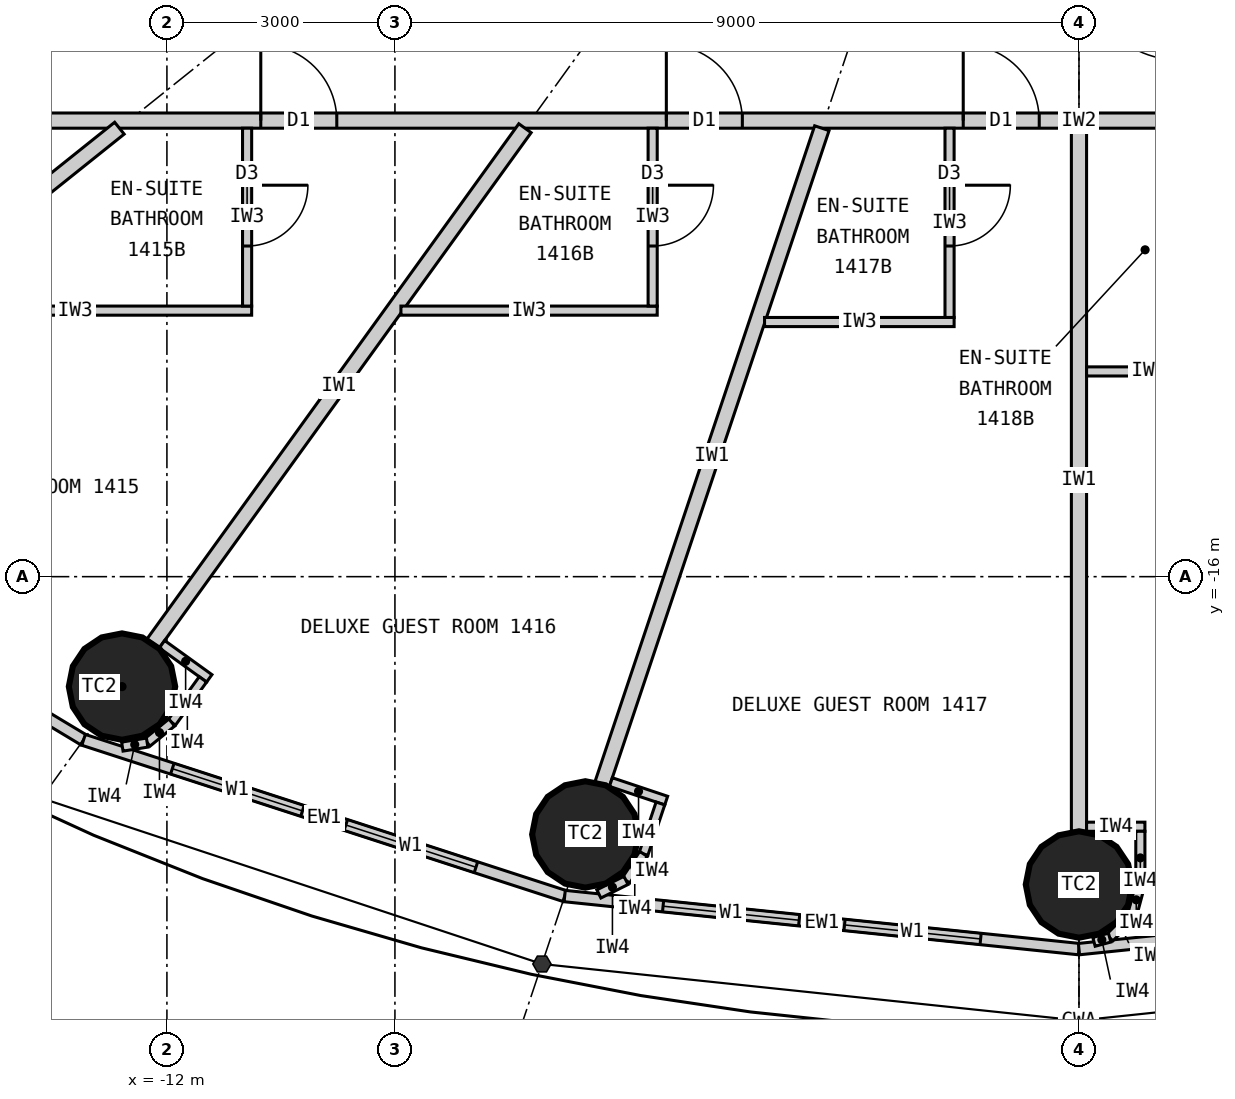
"""IFC4 building model, lengths in metres.
Left out: names, types, materials, properties, quantities, classifications, styles, units other than length and angle.
Written with IfcOpenShell. Run it as: python <this file> out.ifc"""

import sys

from ifc_helpers import new_model, si_unit, direction, frame, frame_2d, origin, origin_2d, place, context, subcontext, project, spatial, rectangle, circle, extrude, element, fill, save


model = new_model("IFC4")
c1 = context("Model", 3, precision=1e-05, world=origin(), true_north=direction((0.0, 1.0)))
c2 = subcontext(c1, "Body", "Model", "MODEL_VIEW")
j1 = project(units=[si_unit("LENGTHUNIT", "METRE"), si_unit("PLANEANGLEUNIT", "RADIAN")], contexts=[c1])
p1 = place(None, origin())
s1 = spatial("IfcSite", under=j1, at=p1, CompositionType="ELEMENT")
p2 = place(p1, origin())
s2 = spatial("IfcBuilding", under=s1, at=p2, CompositionType="ELEMENT")
p3 = place(p2, frame((0.0, 0.0, 60.6)))
s3 = spatial("IfcBuildingStorey", under=s2, at=p3, CompositionType="ELEMENT", Elevation=60.6)
for number, where, z_axis, x_axis in (
    (1, (-12.591, -17.447, 0.0), (0.0, 0.0, 1.0), (1.0, 0.0, 0.0)),
    (2, (-6.495, -19.391, 0.0), (0.0, 0.0, 1.0), (1.0, 0.0, 0.0)),
    (3, (0.0, -20.05, 0.0), (0.0, 0.0, 1.0), (1.0, 0.0, 0.0)),
):
    element("IfcColumn", number, at=place(p3, frame(where, z_axis=z_axis, x_axis=x_axis)), inside=s3, PredefinedType="COLUMN", context=c2, shape_type="SweptSolid", body=[
        extrude(circle(Radius=0.7, at=origin_2d()), origin(), (0.0, 0.0, 1.0), 3.3),
    ])
p4 = place(p3, frame((-18.57, -14.856, 0.0), z_axis=(0.0, 0.0, 1.0), x_axis=(0.856983180864, -0.515344377787, 0.0)))
e4 = element("IfcWall", 4, at=p4, inside=s3, PredefinedType="ELEMENTEDWALL", context=c2, shape_type="SweptSolid", body=[
    extrude(rectangle(XDim=6.386, YDim=0.15, at=frame_2d((3.193, 0.0))), origin(), (0.0, 0.0, 1.0), 3.12),
])
p5 = place(p4, frame((1.093, 0.0, 0.9)))
e5 = element("IfcOpeningElement", 5, at=p5, cuts=e4, PredefinedType="OPENING", context=c2, shape_type="SweptSolid", body=[
    extrude(rectangle(XDim=1.8, YDim=1.9, at=frame_2d((0.9, 0.95))), frame((0.0, 0.085, 0.0), z_axis=(0.0, -1.0, 0.0), x_axis=(1.0, 0.0, 0.0)), (0.0, 0.0, 1.0), 0.17),
])
p6 = place(p4, frame((3.493, 0.0, 0.9)))
e6 = element("IfcOpeningElement", 6, at=p6, cuts=e4, PredefinedType="OPENING", context=c2, shape_type="SweptSolid", body=[
    extrude(rectangle(XDim=1.8, YDim=1.9, at=frame_2d((0.9, 0.95))), frame((0.0, 0.085, 0.0), z_axis=(0.0, -1.0, 0.0), x_axis=(1.0, 0.0, 0.0)), (0.0, 0.0, 1.0), 0.17),
])
p7 = place(p3, frame((-13.096, -18.147, 0.0), z_axis=(0.0, 0.0, 1.0), x_axis=(0.951137534625, -0.308767534285, 0.0)))
e7 = element("IfcWall", 7, at=p7, inside=s3, PredefinedType="ELEMENTEDWALL", context=c2, shape_type="SweptSolid", body=[
    extrude(rectangle(XDim=6.655, YDim=0.15, at=frame_2d((3.328, 0.0))), origin(), (0.0, 0.0, 1.0), 3.12),
])
p8 = place(p7, frame((1.228, 0.0, 0.9)))
e8 = element("IfcOpeningElement", 8, at=p8, cuts=e7, PredefinedType="OPENING", context=c2, shape_type="SweptSolid", body=[
    extrude(rectangle(XDim=1.8, YDim=1.9, at=frame_2d((0.9, 0.95))), frame((0.0, 0.085, 0.0), z_axis=(0.0, -1.0, 0.0), x_axis=(1.0, 0.0, 0.0)), (0.0, 0.0, 1.0), 0.17),
])
p9 = place(p7, frame((3.628, 0.0, 0.9)))
e9 = element("IfcOpeningElement", 9, at=p9, cuts=e7, PredefinedType="OPENING", context=c2, shape_type="SweptSolid", body=[
    extrude(rectangle(XDim=1.8, YDim=1.9, at=frame_2d((0.9, 0.95))), frame((0.0, 0.085, 0.0), z_axis=(0.0, -1.0, 0.0), x_axis=(1.0, 0.0, 0.0)), (0.0, 0.0, 1.0), 0.17),
])
p10 = place(p3, frame((-6.766, -20.202, 0.0), z_axis=(0.0, 0.0, 1.0), x_axis=(0.994721394369, -0.102612609291, 0.0)))
e10 = element("IfcWall", 10, at=p10, inside=s3, PredefinedType="ELEMENTEDWALL", context=c2, shape_type="SweptSolid", body=[
    extrude(rectangle(XDim=6.802, YDim=0.15, at=frame_2d((3.401, 0.0))), origin(), (0.0, 0.0, 1.0), 3.12),
])
p11 = place(p10, frame((1.301, 0.0, 0.9)))
e11 = element("IfcOpeningElement", 11, at=p11, cuts=e10, PredefinedType="OPENING", context=c2, shape_type="SweptSolid", body=[
    extrude(rectangle(XDim=1.8, YDim=1.9, at=frame_2d((0.9, 0.95))), frame((0.0, 0.085, 0.0), z_axis=(0.0, -1.0, 0.0), x_axis=(1.0, 0.0, 0.0)), (0.0, 0.0, 1.0), 0.17),
])
p12 = place(p10, frame((3.701, 0.0, 0.9)))
e12 = element("IfcOpeningElement", 12, at=p12, cuts=e10, PredefinedType="OPENING", context=c2, shape_type="SweptSolid", body=[
    extrude(rectangle(XDim=1.8, YDim=1.9, at=frame_2d((0.9, 0.95))), frame((0.0, 0.085, 0.0), z_axis=(0.0, -1.0, 0.0), x_axis=(1.0, 0.0, 0.0)), (0.0, 0.0, 1.0), 0.17),
])
p13 = place(p3, frame((0.0, -20.9, 0.0), z_axis=(0.0, 0.0, 1.0), x_axis=(0.994721394369, 0.102612609291, 0.0)))
e13 = element("IfcWall", 13, at=p13, inside=s3, PredefinedType="ELEMENTEDWALL", context=c2, shape_type="SweptSolid", body=[
    extrude(rectangle(XDim=6.802, YDim=0.15, at=frame_2d((3.401, 0.0))), origin(), (0.0, 0.0, 1.0), 3.12),
])
p14 = place(p13, frame((1.301, 0.0, 0.9)))
e14 = element("IfcOpeningElement", 14, at=p14, cuts=e13, PredefinedType="OPENING", context=c2, shape_type="SweptSolid", body=[
    extrude(rectangle(XDim=1.8, YDim=1.9, at=frame_2d((0.9, 0.95))), frame((0.0, 0.085, 0.0), z_axis=(0.0, -1.0, 0.0), x_axis=(1.0, 0.0, 0.0)), (0.0, 0.0, 1.0), 0.17),
])
p15 = place(p13, frame((3.701, 0.0, 0.9)))
e15 = element("IfcOpeningElement", 15, at=p15, cuts=e13, PredefinedType="OPENING", context=c2, shape_type="SweptSolid", body=[
    extrude(rectangle(XDim=1.8, YDim=1.9, at=frame_2d((0.9, 0.95))), frame((0.0, 0.085, 0.0), z_axis=(0.0, -1.0, 0.0), x_axis=(1.0, 0.0, 0.0)), (0.0, 0.0, 1.0), 0.17),
])
p16 = place(p3, frame((14.1, -10.0, 0.0), z_axis=(0.0, 0.0, 1.0), x_axis=(-1.0, 0.0, 0.0)))
e16 = element("IfcWall", 16, at=p16, inside=s3, PredefinedType="PARTITIONING", context=c2, shape_type="SweptSolid", body=[
    extrude(rectangle(XDim=28.2, YDim=0.2, at=frame_2d((14.1, 0.0))), origin(), (0.0, 0.0, 1.0), 3.12),
])
p17 = place(p16, frame((23.865, 0.0, 0.0)))
e17 = element("IfcOpeningElement", 17, at=p17, cuts=e16, PredefinedType="OPENING", context=c2, shape_type="SweptSolid", body=[
    extrude(rectangle(XDim=1.0, YDim=2.2, at=frame_2d((0.5, 1.1))), frame((0.0, 0.11, 0.0), z_axis=(0.0, -1.0, 0.0), x_axis=(1.0, 0.0, 0.0)), (0.0, 0.0, 1.0), 0.22),
])
p18 = place(p16, frame((18.529, 0.0, 0.0)))
e18 = element("IfcOpeningElement", 18, at=p18, cuts=e16, PredefinedType="OPENING", context=c2, shape_type="SweptSolid", body=[
    extrude(rectangle(XDim=1.0, YDim=2.2, at=frame_2d((0.5, 1.1))), frame((0.0, 0.11, 0.0), z_axis=(0.0, -1.0, 0.0), x_axis=(1.0, 0.0, 0.0)), (0.0, 0.0, 1.0), 0.22),
])
p19 = place(p16, frame((14.623, 0.0, 0.0)))
e19 = element("IfcOpeningElement", 19, at=p19, cuts=e16, PredefinedType="OPENING", context=c2, shape_type="SweptSolid", body=[
    extrude(rectangle(XDim=1.0, YDim=2.2, at=frame_2d((0.5, 1.1))), frame((0.0, 0.11, 0.0), z_axis=(0.0, -1.0, 0.0), x_axis=(1.0, 0.0, 0.0)), (0.0, 0.0, 1.0), 0.22),
])
p20 = place(p16, frame((11.24, 0.0, 0.0)))
e20 = element("IfcOpeningElement", 20, at=p20, cuts=e16, PredefinedType="OPENING", context=c2, shape_type="SweptSolid", body=[
    extrude(rectangle(XDim=1.0, YDim=2.2, at=frame_2d((0.5, 1.1))), frame((0.0, 0.11, 0.0), z_axis=(0.0, -1.0, 0.0), x_axis=(1.0, 0.0, 0.0)), (0.0, 0.0, 1.0), 0.22),
])
p21 = place(p16, frame((8.671, 0.0, 0.0)))
e21 = element("IfcOpeningElement", 21, at=p21, cuts=e16, PredefinedType="OPENING", context=c2, shape_type="SweptSolid", body=[
    extrude(rectangle(XDim=1.0, YDim=2.2, at=frame_2d((0.5, 1.1))), frame((0.0, 0.11, 0.0), z_axis=(0.0, -1.0, 0.0), x_axis=(1.0, 0.0, 0.0)), (0.0, 0.0, 1.0), 0.22),
])
p22 = place(p16, frame((2.801, 0.0, 0.0)))
e22 = element("IfcOpeningElement", 22, at=p22, cuts=e16, PredefinedType="OPENING", context=c2, shape_type="SweptSolid", body=[
    extrude(rectangle(XDim=1.0, YDim=2.2, at=frame_2d((0.5, 1.1))), frame((0.0, 0.11, 0.0), z_axis=(0.0, -1.0, 0.0), x_axis=(1.0, 0.0, 0.0)), (0.0, 0.0, 1.0), 0.22),
])
p23 = place(p3, frame((-12.625, -10.1, 0.0), z_axis=(0.0, 0.0, 1.0), x_axis=(-0.780892451574, -0.624665493744, 0.0)))
e23 = element("IfcWall", 23, at=p23, inside=s3, PredefinedType="PARTITIONING", context=c2, shape_type="SweptSolid", body=[
    extrude(rectangle(XDim=6.045, YDim=0.2, at=frame_2d((3.022, 0.0))), origin(), (0.0, 0.0, 1.0), 2.32),
])
p24 = place(p3, frame((-7.289, -10.1, 0.0), z_axis=(0.0, 0.0, 1.0), x_axis=(-0.585198353053, -0.810890182197, 0.0)))
e24 = element("IfcWall", 24, at=p24, inside=s3, PredefinedType="PARTITIONING", context=c2, shape_type="SweptSolid", body=[
    extrude(rectangle(XDim=8.36, YDim=0.2, at=frame_2d((4.18, 0.0))), origin(), (0.0, 0.0, 1.0), 2.32),
])
p25 = place(p3, frame((-3.383, -10.1, 0.0), z_axis=(0.0, 0.0, 1.0), x_axis=(-0.31759592231, -0.948226149256, 0.0)))
e25 = element("IfcWall", 25, at=p25, inside=s3, PredefinedType="PARTITIONING", context=c2, shape_type="SweptSolid", body=[
    extrude(rectangle(XDim=9.098, YDim=0.2, at=frame_2d((4.549, 0.0))), origin(), (0.0, 0.0, 1.0), 2.32),
])
p26 = place(p3, frame((0.0, -10.1, 0.0), z_axis=(0.0, 0.0, 1.0), x_axis=(0.0, -1.0, 0.0)))
e26 = element("IfcWall", 26, at=p26, inside=s3, PredefinedType="PARTITIONING", context=c2, shape_type="SweptSolid", body=[
    extrude(rectangle(XDim=9.25, YDim=0.2, at=frame_2d((4.625, 0.0))), origin(), (0.0, 0.0, 1.0), 2.32),
])
p27 = place(p3, frame((-15.525, -12.5, 0.0), z_axis=(0.0, 0.0, 1.0), x_axis=(1.0, 0.0, 0.0)))
e27 = element("IfcWall", 27, at=p27, inside=s3, PredefinedType="PARTITIONING", context=c2, shape_type="SweptSolid", body=[
    extrude(rectangle(XDim=4.64, YDim=0.12, at=frame_2d((2.32, 0.0))), origin(), (0.0, 0.0, 1.0), 3.12),
])
p28 = place(p3, frame((-10.945, -10.1, 0.0), z_axis=(0.0, 0.0, 1.0), x_axis=(0.0, -1.0, 0.0)))
e28 = element("IfcWall", 28, at=p28, inside=s3, PredefinedType="PARTITIONING", context=c2, shape_type="SweptSolid", body=[
    extrude(rectangle(XDim=2.34, YDim=0.12, at=frame_2d((1.17, 0.0))), origin(), (0.0, 0.0, 1.0), 3.12),
])
p29 = place(p28, frame((0.75, 0.0, 0.0)))
e29 = element("IfcOpeningElement", 29, at=p29, cuts=e28, PredefinedType="OPENING", context=c2, shape_type="SweptSolid", body=[
    extrude(rectangle(XDim=0.8, YDim=2.1, at=frame_2d((0.4, 1.05))), frame((0.0, 0.07, 0.0), z_axis=(0.0, -1.0, 0.0), x_axis=(1.0, 0.0, 0.0)), (0.0, 0.0, 1.0), 0.14),
])
p30 = place(p3, frame((-8.921, -12.5, 0.0), z_axis=(0.0, 0.0, 1.0), x_axis=(1.0, 0.0, 0.0)))
e30 = element("IfcWall", 30, at=p30, inside=s3, PredefinedType="PARTITIONING", context=c2, shape_type="SweptSolid", body=[
    extrude(rectangle(XDim=3.372, YDim=0.12, at=frame_2d((1.686, 0.0))), origin(), (0.0, 0.0, 1.0), 3.12),
])
p31 = place(p3, frame((-5.609, -10.1, 0.0), z_axis=(0.0, 0.0, 1.0), x_axis=(0.0, -1.0, 0.0)))
e31 = element("IfcWall", 31, at=p31, inside=s3, PredefinedType="PARTITIONING", context=c2, shape_type="SweptSolid", body=[
    extrude(rectangle(XDim=2.34, YDim=0.12, at=frame_2d((1.17, 0.0))), origin(), (0.0, 0.0, 1.0), 3.12),
])
p32 = place(p31, frame((0.75, 0.0, 0.0)))
e32 = element("IfcOpeningElement", 32, at=p32, cuts=e31, PredefinedType="OPENING", context=c2, shape_type="SweptSolid", body=[
    extrude(rectangle(XDim=0.8, YDim=2.1, at=frame_2d((0.4, 1.05))), frame((0.0, 0.07, 0.0), z_axis=(0.0, -1.0, 0.0), x_axis=(1.0, 0.0, 0.0)), (0.0, 0.0, 1.0), 0.14),
])
p33 = place(p3, frame((-4.137, -12.65, 0.0), z_axis=(0.0, 0.0, 1.0), x_axis=(1.0, 0.0, 0.0)))
e33 = element("IfcWall", 33, at=p33, inside=s3, PredefinedType="PARTITIONING", context=c2, shape_type="SweptSolid", body=[
    extrude(rectangle(XDim=2.494, YDim=0.12, at=frame_2d((1.247, 0.0))), origin(), (0.0, 0.0, 1.0), 3.12),
])
p34 = place(p3, frame((-1.703, -10.1, 0.0), z_axis=(0.0, 0.0, 1.0), x_axis=(0.0, -1.0, 0.0)))
e34 = element("IfcWall", 34, at=p34, inside=s3, PredefinedType="PARTITIONING", context=c2, shape_type="SweptSolid", body=[
    extrude(rectangle(XDim=2.49, YDim=0.12, at=frame_2d((1.245, 0.0))), origin(), (0.0, 0.0, 1.0), 3.12),
])
p35 = place(p34, frame((0.75, 0.0, 0.0)))
e35 = element("IfcOpeningElement", 35, at=p35, cuts=e34, PredefinedType="OPENING", context=c2, shape_type="SweptSolid", body=[
    extrude(rectangle(XDim=0.8, YDim=2.1, at=frame_2d((0.4, 1.05))), frame((0.0, 0.07, 0.0), z_axis=(0.0, -1.0, 0.0), x_axis=(1.0, 0.0, 0.0)), (0.0, 0.0, 1.0), 0.14),
])
p36 = place(p3, frame((0.1, -13.3, 0.0), z_axis=(0.0, 0.0, 1.0), x_axis=(1.0, 0.0, 0.0)))
e36 = element("IfcWall", 36, at=p36, inside=s3, PredefinedType="PARTITIONING", context=c2, shape_type="SweptSolid", body=[
    extrude(rectangle(XDim=1.64, YDim=0.12, at=frame_2d((0.82, 0.0))), origin(), (0.0, 0.0, 1.0), 3.12),
])
p37 = place(p3, frame((-12.065, -16.889, 0.0), z_axis=(0.0, 0.0, 1.0), x_axis=(0.810821798253, -0.585293098778, 0.0)))
e37 = element("IfcWall", 37, at=p37, inside=s3, PredefinedType="PARTITIONING", context=c2, shape_type="SweptSolid", body=[
    extrude(rectangle(XDim=0.768, YDim=0.12, at=frame_2d((0.384, 0.0))), origin(), (0.0, 0.0, 1.0), 3.12),
])
p38 = place(p3, frame((-11.526, -17.351, 0.0), z_axis=(0.0, 0.0, 1.0), x_axis=(-0.585223113993, -0.810872312296, 0.0)))
e38 = element("IfcWall", 38, at=p38, inside=s3, PredefinedType="PARTITIONING", context=c2, shape_type="SweptSolid", body=[
    extrude(rectangle(XDim=0.7, YDim=0.12, at=frame_2d((0.35, 0.0))), origin(), (0.0, 0.0, 1.0), 3.12),
])
p39 = place(p3, frame((-11.936, -17.919, 0.0), z_axis=(0.0, 0.0, 1.0), x_axis=(-0.775023088441, -0.631932917629, 0.0)))
e39 = element("IfcWall", 39, at=p39, inside=s3, PredefinedType="PARTITIONING", context=c2, shape_type="SweptSolid", body=[
    extrude(rectangle(XDim=0.418, YDim=0.12, at=frame_2d((0.209, 0.0))), origin(), (0.0, 0.0, 1.0), 3.12),
])
p40 = place(p3, frame((-12.26, -18.183, 0.0), z_axis=(0.0, 0.0, 1.0), x_axis=(-0.987218661664, -0.159371622511, 0.0)))
e40 = element("IfcWall", 40, at=p40, inside=s3, PredefinedType="PARTITIONING", context=c2, shape_type="SweptSolid", body=[
    extrude(rectangle(XDim=0.331, YDim=0.12, at=frame_2d((0.166, 0.0))), origin(), (0.0, 0.0, 1.0), 3.12),
])
p41 = place(p3, frame((-6.159, -18.702, 0.0), z_axis=(0.0, 0.0, 1.0), x_axis=(0.948173154049, -0.31775410295, 0.0)))
e41 = element("IfcWall", 41, at=p41, inside=s3, PredefinedType="PARTITIONING", context=c2, shape_type="SweptSolid", body=[
    extrude(rectangle(XDim=0.768, YDim=0.12, at=frame_2d((0.384, 0.0))), origin(), (0.0, 0.0, 1.0), 3.12),
])
p42 = place(p3, frame((-5.507, -18.984, 0.0), z_axis=(0.0, 0.0, 1.0), x_axis=(-0.317692050622, -0.948193946918, 0.0)))
e42 = element("IfcWall", 42, at=p42, inside=s3, PredefinedType="PARTITIONING", context=c2, shape_type="SweptSolid", body=[
    extrude(rectangle(XDim=0.7, YDim=0.12, at=frame_2d((0.35, 0.0))), origin(), (0.0, 0.0, 1.0), 3.12),
])
p43 = place(p3, frame((-5.729, -19.648, 0.0), z_axis=(0.0, 0.0, 1.0), x_axis=(-0.552135764955, -0.833754218615, 0.0)))
e43 = element("IfcWall", 43, at=p43, inside=s3, PredefinedType="PARTITIONING", context=c2, shape_type="SweptSolid", body=[
    extrude(rectangle(XDim=0.418, YDim=0.12, at=frame_2d((0.209, 0.0))), origin(), (0.0, 0.0, 1.0), 3.12),
])
p44 = place(p3, frame((-5.96, -19.996, 0.0), z_axis=(0.0, 0.0, 1.0), x_axis=(-0.895160725913, -0.445743507842, 0.0)))
e44 = element("IfcWall", 44, at=p44, inside=s3, PredefinedType="PARTITIONING", context=c2, shape_type="SweptSolid", body=[
    extrude(rectangle(XDim=0.399, YDim=0.12, at=frame_2d((0.199, 0.0))), origin(), (0.0, 0.0, 1.0), 3.12),
])
p45 = place(p3, frame((0.1, -19.29, 0.0), z_axis=(0.0, 0.0, 1.0), x_axis=(1.0, 0.0, 0.0)))
e45 = element("IfcWall", 45, at=p45, inside=s3, PredefinedType="PARTITIONING", context=c2, shape_type="SweptSolid", body=[
    extrude(rectangle(XDim=0.767, YDim=0.12, at=frame_2d((0.384, 0.0))), origin(), (0.0, 0.0, 1.0), 3.12),
])
p46 = place(p3, frame((0.808, -19.35, 0.0), z_axis=(0.0, 0.0, 1.0), x_axis=(0.0, -1.0, 0.0)))
e46 = element("IfcWall", 46, at=p46, inside=s3, PredefinedType="PARTITIONING", context=c2, shape_type="SweptSolid", body=[
    extrude(rectangle(XDim=0.7, YDim=0.12, at=frame_2d((0.35, 0.0))), origin(), (0.0, 0.0, 1.0), 3.12),
])
p47 = place(p3, frame((0.808, -20.05, 0.0), z_axis=(0.0, 0.0, 1.0), x_axis=(-0.2592614205, -0.965807183573, 0.0)))
e47 = element("IfcWall", 47, at=p47, inside=s3, PredefinedType="PARTITIONING", context=c2, shape_type="SweptSolid", body=[
    extrude(rectangle(XDim=0.418, YDim=0.12, at=frame_2d((0.209, 0.0))), origin(), (0.0, 0.0, 1.0), 3.12),
])
p48 = place(p3, frame((0.699, -20.454, 0.0), z_axis=(0.0, 0.0, 1.0), x_axis=(-0.707106781187, -0.707106781187, 0.0)))
e48 = element("IfcWall", 48, at=p48, inside=s3, PredefinedType="PARTITIONING", context=c2, shape_type="SweptSolid", body=[
    extrude(rectangle(XDim=0.418, YDim=0.12, at=frame_2d((0.209, 0.0))), origin(), (0.0, 0.0, 1.0), 3.12),
])
p49 = place(p3, frame((0.404, -20.749, 0.0), z_axis=(0.0, 0.0, 1.0), x_axis=(-0.965759066438, -0.25944060128, 0.0)))
e49 = element("IfcWall", 49, at=p49, inside=s3, PredefinedType="PARTITIONING", context=c2, shape_type="SweptSolid", body=[
    extrude(rectangle(XDim=0.214, YDim=0.12, at=frame_2d((0.107, 0.0))), origin(), (0.0, 0.0, 1.0), 3.12),
])
p50 = place(p8, origin())
e50 = element("IfcWindow", 50, at=p50, inside=s3, PartitioningType="SINGLE_PANEL", PredefinedType="WINDOW", context=c2, shape_type="SweptSolid", body=[
    extrude(rectangle(XDim=1.8, YDim=1.9, at=frame_2d((0.9, 0.95))), frame((0.0, 0.03, 0.0), z_axis=(0.0, -1.0, 0.0), x_axis=(1.0, 0.0, 0.0)), (0.0, 0.0, 1.0), 0.06),
])
fill(e8, e50)
p51 = place(p9, origin())
e51 = element("IfcWindow", 51, at=p51, inside=s3, PartitioningType="SINGLE_PANEL", PredefinedType="WINDOW", context=c2, shape_type="SweptSolid", body=[
    extrude(rectangle(XDim=1.8, YDim=1.9, at=frame_2d((0.9, 0.95))), frame((0.0, 0.03, 0.0), z_axis=(0.0, -1.0, 0.0), x_axis=(1.0, 0.0, 0.0)), (0.0, 0.0, 1.0), 0.06),
])
fill(e9, e51)
p52 = place(p11, origin())
e52 = element("IfcWindow", 52, at=p52, inside=s3, PartitioningType="SINGLE_PANEL", PredefinedType="WINDOW", context=c2, shape_type="SweptSolid", body=[
    extrude(rectangle(XDim=1.8, YDim=1.9, at=frame_2d((0.9, 0.95))), frame((0.0, 0.03, 0.0), z_axis=(0.0, -1.0, 0.0), x_axis=(1.0, 0.0, 0.0)), (0.0, 0.0, 1.0), 0.06),
])
fill(e11, e52)
p53 = place(p12, origin())
e53 = element("IfcWindow", 53, at=p53, inside=s3, PartitioningType="SINGLE_PANEL", PredefinedType="WINDOW", context=c2, shape_type="SweptSolid", body=[
    extrude(rectangle(XDim=1.8, YDim=1.9, at=frame_2d((0.9, 0.95))), frame((0.0, 0.03, 0.0), z_axis=(0.0, -1.0, 0.0), x_axis=(1.0, 0.0, 0.0)), (0.0, 0.0, 1.0), 0.06),
])
fill(e12, e53)
p54 = place(p29, origin())
e54 = element("IfcDoor", 54, at=p54, inside=s3, OperationType="SINGLE_SWING_LEFT", PredefinedType="DOOR", context=c2, shape_type="SweptSolid", body=[
    extrude(rectangle(XDim=0.8, YDim=2.1, at=frame_2d((0.4, 1.05))), frame((0.0, 0.025, 0.0), z_axis=(0.0, -1.0, 0.0), x_axis=(1.0, 0.0, 0.0)), (0.0, 0.0, 1.0), 0.05),
])
fill(e29, e54)
p55 = place(p17, origin())
e55 = element("IfcDoor", 55, at=p55, inside=s3, OperationType="SINGLE_SWING_RIGHT", PredefinedType="DOOR", context=c2, shape_type="SweptSolid", body=[
    extrude(rectangle(XDim=1.0, YDim=2.2, at=frame_2d((0.5, 1.1))), frame((0.0, 0.025, 0.0), z_axis=(0.0, -1.0, 0.0), x_axis=(1.0, 0.0, 0.0)), (0.0, 0.0, 1.0), 0.05),
])
fill(e17, e55)
p56 = place(p32, origin())
e56 = element("IfcDoor", 56, at=p56, inside=s3, OperationType="SINGLE_SWING_LEFT", PredefinedType="DOOR", context=c2, shape_type="SweptSolid", body=[
    extrude(rectangle(XDim=0.8, YDim=2.1, at=frame_2d((0.4, 1.05))), frame((0.0, 0.025, 0.0), z_axis=(0.0, -1.0, 0.0), x_axis=(1.0, 0.0, 0.0)), (0.0, 0.0, 1.0), 0.05),
])
fill(e32, e56)
p57 = place(p18, origin())
e57 = element("IfcDoor", 57, at=p57, inside=s3, OperationType="SINGLE_SWING_RIGHT", PredefinedType="DOOR", context=c2, shape_type="SweptSolid", body=[
    extrude(rectangle(XDim=1.0, YDim=2.2, at=frame_2d((0.5, 1.1))), frame((0.0, 0.025, 0.0), z_axis=(0.0, -1.0, 0.0), x_axis=(1.0, 0.0, 0.0)), (0.0, 0.0, 1.0), 0.05),
])
fill(e18, e57)
p58 = place(p35, origin())
e58 = element("IfcDoor", 58, at=p58, inside=s3, OperationType="SINGLE_SWING_LEFT", PredefinedType="DOOR", context=c2, shape_type="SweptSolid", body=[
    extrude(rectangle(XDim=0.8, YDim=2.1, at=frame_2d((0.4, 1.05))), frame((0.0, 0.025, 0.0), z_axis=(0.0, -1.0, 0.0), x_axis=(1.0, 0.0, 0.0)), (0.0, 0.0, 1.0), 0.05),
])
fill(e35, e58)
p59 = place(p19, origin())
e59 = element("IfcDoor", 59, at=p59, inside=s3, OperationType="SINGLE_SWING_RIGHT", PredefinedType="DOOR", context=c2, shape_type="SweptSolid", body=[
    extrude(rectangle(XDim=1.0, YDim=2.2, at=frame_2d((0.5, 1.1))), frame((0.0, 0.025, 0.0), z_axis=(0.0, -1.0, 0.0), x_axis=(1.0, 0.0, 0.0)), (0.0, 0.0, 1.0), 0.05),
])
fill(e19, e59)
save(model, sys.argv[1])
